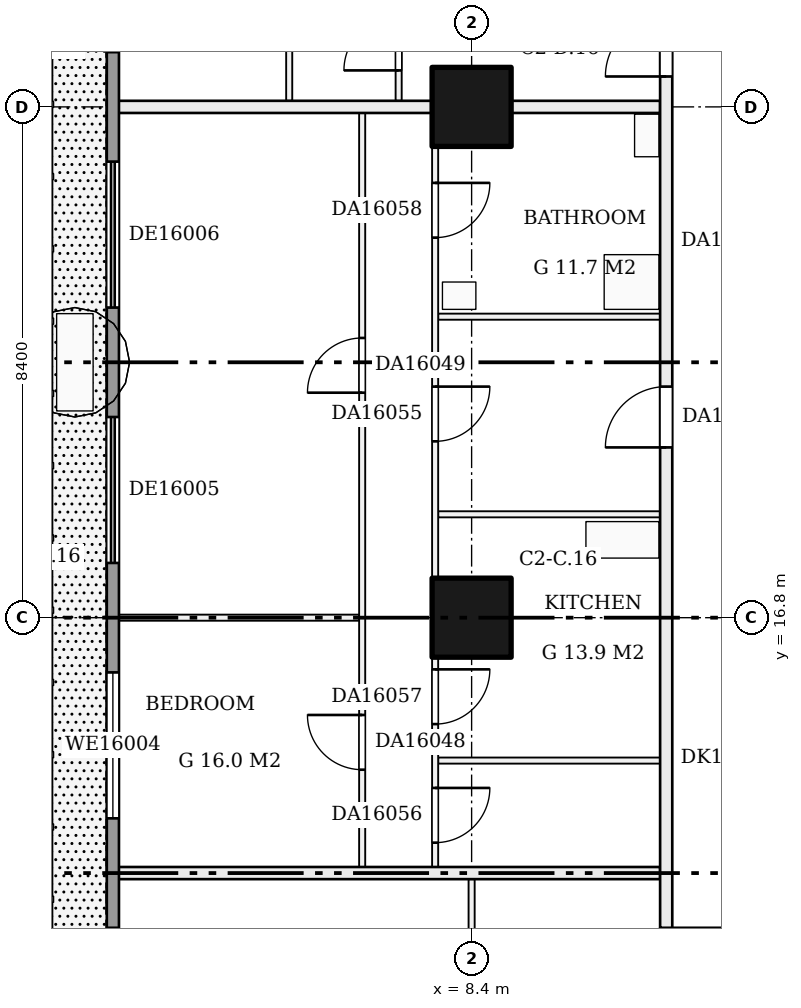
"""IFC4 building model, lengths in metres.
Left out: names, types, materials, properties, quantities, classifications, styles, units other than length and angle.
Written with IfcOpenShell. Run it as: python <this file> out.ifc"""

import sys

from ifc_helpers import new_model, si_unit, direction, frame, frame_2d, origin, origin_2d, place, context, subcontext, project, spatial, rectangle, extrude, element, fill, save


model = new_model("IFC4")
c1 = context("Model", 3, precision=1e-05, world=origin(), true_north=direction((0.0, 1.0)))
c2 = subcontext(c1, "Body", "Model", "MODEL_VIEW")
j1 = project(units=[si_unit("LENGTHUNIT", "METRE"), si_unit("PLANEANGLEUNIT", "RADIAN")], contexts=[c1])
p1 = place(None, origin())
s1 = spatial("IfcSite", under=j1, at=p1, CompositionType="ELEMENT")
p2 = place(p1, origin())
s2 = spatial("IfcBuilding", under=s1, at=p2, CompositionType="ELEMENT")
p3 = place(p2, frame((0.0, 0.0, 67.2)))
s3 = spatial("IfcBuildingStorey", under=s2, at=p3, CompositionType="ELEMENT", Elevation=67.2)
for number, where, z_axis, x_axis in (
    (1, (8.4, 16.8, 0.0), (0.0, 0.0, 1.0), (1.0, 0.0, 0.0)),
    (2, (8.4, 25.2, 0.0), (0.0, 0.0, 1.0), (1.0, 0.0, 0.0)),
):
    element("IfcColumn", number, at=place(p3, frame(where, z_axis=z_axis, x_axis=x_axis)), inside=s3, PredefinedType="COLUMN", context=c2, shape_type="SweptSolid", body=[
        extrude(rectangle(XDim=1.3, YDim=1.3, at=origin_2d()), origin(), (0.0, 0.0, 1.0), 3.22),
    ])
p4 = place(p3, frame((11.5, 11.6, 0.0), z_axis=(0.0, 0.0, 1.0), x_axis=(1.0, 0.0, 0.0)))
e3 = element("IfcWall", 3, at=p4, inside=s3, PredefinedType="PARTITIONING", context=c2, shape_type="SweptSolid", body=[
    extrude(rectangle(XDim=30.5, YDim=0.2, at=frame_2d((15.25, 0.0))), origin(), (0.0, 0.0, 1.0), 3.22),
])
p5 = place(p4, frame((1.6, 0.0, 0.0)))
e4 = element("IfcOpeningElement", 4, at=p5, cuts=e3, PredefinedType="OPENING", context=c2, shape_type="SweptSolid", body=[
    extrude(rectangle(XDim=1.0, YDim=2.1, at=frame_2d((0.5, 1.05))), frame((0.0, 0.11, 0.0), z_axis=(0.0, -1.0, 0.0), x_axis=(1.0, 0.0, 0.0)), (0.0, 0.0, 1.0), 0.22),
])
p6 = place(p4, frame((8.04, 0.0, 0.0)))
e5 = element("IfcOpeningElement", 5, at=p6, cuts=e3, PredefinedType="OPENING", context=c2, shape_type="SweptSolid", body=[
    extrude(rectangle(XDim=1.0, YDim=2.1, at=frame_2d((0.5, 1.05))), frame((0.0, 0.11, 0.0), z_axis=(0.0, -1.0, 0.0), x_axis=(1.0, 0.0, 0.0)), (0.0, 0.0, 1.0), 0.22),
])
p7 = place(p4, frame((10.5, 0.0, 0.0)))
e6 = element("IfcOpeningElement", 6, at=p7, cuts=e3, PredefinedType="OPENING", context=c2, shape_type="SweptSolid", body=[
    extrude(rectangle(XDim=1.0, YDim=2.1, at=frame_2d((0.5, 1.05))), frame((0.0, 0.11, 0.0), z_axis=(0.0, -1.0, 0.0), x_axis=(1.0, 0.0, 0.0)), (0.0, 0.0, 1.0), 0.22),
])
p8 = place(p4, frame((28.733, 0.0, 0.0)))
e7 = element("IfcOpeningElement", 7, at=p8, cuts=e3, PredefinedType="OPENING", context=c2, shape_type="SweptSolid", body=[
    extrude(rectangle(XDim=1.0, YDim=2.1, at=frame_2d((0.5, 1.05))), frame((0.0, 0.11, 0.0), z_axis=(0.0, -1.0, 0.0), x_axis=(1.0, 0.0, 0.0)), (0.0, 0.0, 1.0), 0.22),
])
p9 = place(p3, frame((2.5, 12.6, 0.0), z_axis=(0.0, 0.0, 1.0), x_axis=(1.0, 0.0, 0.0)))
e8 = element("IfcWall", 8, at=p9, inside=s3, PredefinedType="PARTITIONING", context=c2, shape_type="SweptSolid", body=[
    extrude(rectangle(XDim=9.0, YDim=0.2, at=frame_2d((4.5, 0.0))), origin(), (0.0, 0.0, 1.0), 3.22),
])
p10 = place(p3, frame((7.85, 14.45, 0.0), z_axis=(0.0, 0.0, 1.0), x_axis=(1.0, 0.0, 0.0)))
e9 = element("IfcWall", 9, at=p10, inside=s3, PredefinedType="PARTITIONING", context=c2, shape_type="SweptSolid", body=[
    extrude(rectangle(XDim=3.65, YDim=0.1, at=frame_2d((1.825, 0.0))), origin(), (0.0, 0.0, 1.0), 3.22),
])
p11 = place(p3, frame((2.5, 16.8, 0.0), z_axis=(0.0, 0.0, 1.0), x_axis=(1.0, 0.0, 0.0)))
e10 = element("IfcWall", 10, at=p11, inside=s3, PredefinedType="PARTITIONING", context=c2, shape_type="SweptSolid", body=[
    extrude(rectangle(XDim=4.05, YDim=0.1, at=frame_2d((2.025, 0.0))), origin(), (0.0, 0.0, 1.0), 3.22),
])
for number, where, z_axis, x_axis in (
    (11, (7.85, 18.5, 0.0), (0.0, 0.0, 1.0), (1.0, 0.0, 0.0)),
    (12, (7.85, 21.75, 0.0), (0.0, 0.0, 1.0), (1.0, 0.0, 0.0)),
):
    element("IfcWall", number, at=place(p3, frame(where, z_axis=z_axis, x_axis=x_axis)), inside=s3, PredefinedType="PARTITIONING", context=c2, shape_type="SweptSolid", body=[
        extrude(rectangle(XDim=3.65, YDim=0.1, at=frame_2d((1.825, 0.0))), origin(), (0.0, 0.0, 1.0), 3.22),
    ])
p12 = place(p3, frame((2.5, 25.2, 0.0), z_axis=(0.0, 0.0, 1.0), x_axis=(1.0, 0.0, 0.0)))
e13 = element("IfcWall", 13, at=p12, inside=s3, PredefinedType="PARTITIONING", context=c2, shape_type="SweptSolid", body=[
    extrude(rectangle(XDim=9.0, YDim=0.2, at=frame_2d((4.5, 0.0))), origin(), (0.0, 0.0, 1.0), 3.22),
])
p13 = place(p3, frame((5.4, 25.3, 0.0), z_axis=(0.0, 0.0, 1.0), x_axis=(0.0, 1.0, 0.0)))
e14 = element("IfcWall", 14, at=p13, inside=s3, PredefinedType="PARTITIONING", context=c2, shape_type="SweptSolid", body=[
    extrude(rectangle(XDim=4.0, YDim=0.1, at=frame_2d((2.0, 0.0))), origin(), (0.0, 0.0, 1.0), 3.22),
])
p14 = place(p13, frame((1.5, 0.0, 0.0)))
e15 = element("IfcOpeningElement", 15, at=p14, cuts=e14, PredefinedType="OPENING", context=c2, shape_type="SweptSolid", body=[
    extrude(rectangle(XDim=0.9, YDim=2.1, at=frame_2d((0.45, 1.05))), frame((0.0, 0.06, 0.0), z_axis=(0.0, -1.0, 0.0), x_axis=(1.0, 0.0, 0.0)), (0.0, 0.0, 1.0), 0.12),
])
p15 = place(p3, frame((6.6, 12.7, 0.0), z_axis=(0.0, 0.0, 1.0), x_axis=(0.0, 1.0, 0.0)))
e16 = element("IfcWall", 16, at=p15, inside=s3, PredefinedType="PARTITIONING", context=c2, shape_type="SweptSolid", body=[
    extrude(rectangle(XDim=12.4, YDim=0.1, at=frame_2d((6.2, 0.0))), origin(), (0.0, 0.0, 1.0), 3.22),
])
p16 = place(p15, frame((1.6, 0.0, 0.0)))
e17 = element("IfcOpeningElement", 17, at=p16, cuts=e16, PredefinedType="OPENING", context=c2, shape_type="SweptSolid", body=[
    extrude(rectangle(XDim=0.9, YDim=2.1, at=frame_2d((0.45, 1.05))), frame((0.0, 0.06, 0.0), z_axis=(0.0, -1.0, 0.0), x_axis=(1.0, 0.0, 0.0)), (0.0, 0.0, 1.0), 0.12),
])
p17 = place(p15, frame((7.8, 0.0, 0.0)))
e18 = element("IfcOpeningElement", 18, at=p17, cuts=e16, PredefinedType="OPENING", context=c2, shape_type="SweptSolid", body=[
    extrude(rectangle(XDim=0.9, YDim=2.1, at=frame_2d((0.45, 1.05))), frame((0.0, 0.06, 0.0), z_axis=(0.0, -1.0, 0.0), x_axis=(1.0, 0.0, 0.0)), (0.0, 0.0, 1.0), 0.12),
])
p18 = place(p3, frame((7.2, 25.3, 0.0), z_axis=(0.0, 0.0, 1.0), x_axis=(0.0, 1.0, 0.0)))
e19 = element("IfcWall", 19, at=p18, inside=s3, PredefinedType="PARTITIONING", context=c2, shape_type="SweptSolid", body=[
    extrude(rectangle(XDim=4.0, YDim=0.1, at=frame_2d((2.0, 0.0))), origin(), (0.0, 0.0, 1.0), 3.22),
])
p19 = place(p18, frame((0.5, 0.0, 0.0)))
e20 = element("IfcOpeningElement", 20, at=p19, cuts=e19, PredefinedType="OPENING", context=c2, shape_type="SweptSolid", body=[
    extrude(rectangle(XDim=0.9, YDim=2.1, at=frame_2d((0.45, 1.05))), frame((0.0, 0.06, 0.0), z_axis=(0.0, -1.0, 0.0), x_axis=(1.0, 0.0, 0.0)), (0.0, 0.0, 1.0), 0.12),
])
p20 = place(p18, frame((2.56, 0.0, 0.0)))
e21 = element("IfcOpeningElement", 21, at=p20, cuts=e19, PredefinedType="OPENING", context=c2, shape_type="SweptSolid", body=[
    extrude(rectangle(XDim=0.9, YDim=2.1, at=frame_2d((0.45, 1.05))), frame((0.0, 0.06, 0.0), z_axis=(0.0, -1.0, 0.0), x_axis=(1.0, 0.0, 0.0)), (0.0, 0.0, 1.0), 0.12),
])
p21 = place(p3, frame((7.8, 12.7, 0.0), z_axis=(0.0, 0.0, 1.0), x_axis=(0.0, 1.0, 0.0)))
e22 = element("IfcWall", 22, at=p21, inside=s3, PredefinedType="PARTITIONING", context=c2, shape_type="SweptSolid", body=[
    extrude(rectangle(XDim=12.4, YDim=0.1, at=frame_2d((6.2, 0.0))), origin(), (0.0, 0.0, 1.0), 3.22),
])
p22 = place(p21, frame((7.0, 0.0, 0.0)))
e23 = element("IfcOpeningElement", 23, at=p22, cuts=e22, PredefinedType="OPENING", context=c2, shape_type="SweptSolid", body=[
    extrude(rectangle(XDim=0.9, YDim=2.1, at=frame_2d((0.45, 1.05))), frame((0.0, 0.06, 0.0), z_axis=(0.0, -1.0, 0.0), x_axis=(1.0, 0.0, 0.0)), (0.0, 0.0, 1.0), 0.12),
])
p23 = place(p21, frame((0.4, 0.0, 0.0)))
e24 = element("IfcOpeningElement", 24, at=p23, cuts=e22, PredefinedType="OPENING", context=c2, shape_type="SweptSolid", body=[
    extrude(rectangle(XDim=0.9, YDim=2.1, at=frame_2d((0.45, 1.05))), frame((0.0, 0.06, 0.0), z_axis=(0.0, -1.0, 0.0), x_axis=(1.0, 0.0, 0.0)), (0.0, 0.0, 1.0), 0.12),
])
p24 = place(p21, frame((2.35, 0.0, 0.0)))
e25 = element("IfcOpeningElement", 25, at=p24, cuts=e22, PredefinedType="OPENING", context=c2, shape_type="SweptSolid", body=[
    extrude(rectangle(XDim=0.9, YDim=2.1, at=frame_2d((0.45, 1.05))), frame((0.0, 0.06, 0.0), z_axis=(0.0, -1.0, 0.0), x_axis=(1.0, 0.0, 0.0)), (0.0, 0.0, 1.0), 0.12),
])
p25 = place(p21, frame((10.35, 0.0, 0.0)))
e26 = element("IfcOpeningElement", 26, at=p25, cuts=e22, PredefinedType="OPENING", context=c2, shape_type="SweptSolid", body=[
    extrude(rectangle(XDim=0.9, YDim=2.1, at=frame_2d((0.45, 1.05))), frame((0.0, 0.06, 0.0), z_axis=(0.0, -1.0, 0.0), x_axis=(1.0, 0.0, 0.0)), (0.0, 0.0, 1.0), 0.12),
])
p26 = place(p3, frame((8.4, 9.1, 0.0), z_axis=(0.0, 0.0, 1.0), x_axis=(0.0, 1.0, 0.0)))
e27 = element("IfcWall", 27, at=p26, inside=s3, PredefinedType="PARTITIONING", context=c2, shape_type="SweptSolid", body=[
    extrude(rectangle(XDim=3.4, YDim=0.1, at=frame_2d((1.7, 0.0))), origin(), (0.0, 0.0, 1.0), 3.22),
])
p27 = place(p3, frame((11.6, 11.7, 0.0), z_axis=(0.0, 0.0, 1.0), x_axis=(0.0, 1.0, 0.0)))
e28 = element("IfcWall", 28, at=p27, inside=s3, PredefinedType="PARTITIONING", context=c2, shape_type="SweptSolid", body=[
    extrude(rectangle(XDim=30.3, YDim=0.2, at=frame_2d((15.15, 0.0))), origin(), (0.0, 0.0, 1.0), 3.22),
])
p28 = place(p27, frame((7.9, 0.0, 0.0)))
e29 = element("IfcOpeningElement", 29, at=p28, cuts=e28, PredefinedType="OPENING", context=c2, shape_type="SweptSolid", body=[
    extrude(rectangle(XDim=1.0, YDim=2.1, at=frame_2d((0.5, 1.05))), frame((0.0, 0.11, 0.0), z_axis=(0.0, -1.0, 0.0), x_axis=(1.0, 0.0, 0.0)), (0.0, 0.0, 1.0), 0.22),
])
p29 = place(p27, frame((14.0, 0.0, 0.0)))
e30 = element("IfcOpeningElement", 30, at=p29, cuts=e28, PredefinedType="OPENING", context=c2, shape_type="SweptSolid", body=[
    extrude(rectangle(XDim=1.0, YDim=2.1, at=frame_2d((0.5, 1.05))), frame((0.0, 0.11, 0.0), z_axis=(0.0, -1.0, 0.0), x_axis=(1.0, 0.0, 0.0)), (0.0, 0.0, 1.0), 0.22),
])
p30 = place(p27, frame((22.92, 0.0, 0.0)))
e31 = element("IfcOpeningElement", 31, at=p30, cuts=e28, PredefinedType="OPENING", context=c2, shape_type="SweptSolid", body=[
    extrude(rectangle(XDim=1.0, YDim=2.1, at=frame_2d((0.5, 1.05))), frame((0.0, 0.11, 0.0), z_axis=(0.0, -1.0, 0.0), x_axis=(1.0, 0.0, 0.0)), (0.0, 0.0, 1.0), 0.22),
])
p31 = place(p3, frame((2.5, 53.8, 0.0), z_axis=(0.0, 0.0, 1.0), x_axis=(0.0, -1.0, 0.0)))
e32 = element("IfcWall", 32, at=p31, inside=s3, PredefinedType="SOLIDWALL", context=c2, shape_type="SweptSolid", body=[
    extrude(rectangle(XDim=48.8, YDim=0.2, at=frame_2d((24.4, 0.0))), origin(), (0.0, 0.0, 1.0), 3.22),
])
p32 = place(p31, frame((46.1, 0.0, 0.0)))
e33 = element("IfcOpeningElement", 33, at=p32, cuts=e32, PredefinedType="OPENING", context=c2, shape_type="SweptSolid", body=[
    extrude(rectangle(XDim=2.4, YDim=2.2, at=frame_2d((1.2, 1.1))), frame((0.0, 0.11, 0.0), z_axis=(0.0, -1.0, 0.0), x_axis=(1.0, 0.0, 0.0)), (0.0, 0.0, 1.0), 0.22),
])
p33 = place(p31, frame((42.1, 0.0, 0.0)))
e34 = element("IfcOpeningElement", 34, at=p33, cuts=e32, PredefinedType="OPENING", context=c2, shape_type="SweptSolid", body=[
    extrude(rectangle(XDim=2.4, YDim=2.2, at=frame_2d((1.2, 1.1))), frame((0.0, 0.11, 0.0), z_axis=(0.0, -1.0, 0.0), x_axis=(1.0, 0.0, 0.0)), (0.0, 0.0, 1.0), 0.22),
])
p34 = place(p31, frame((37.9, 0.0, 0.9)))
e35 = element("IfcOpeningElement", 35, at=p34, cuts=e32, PredefinedType="OPENING", context=c2, shape_type="SweptSolid", body=[
    extrude(rectangle(XDim=2.4, YDim=1.5, at=frame_2d((1.2, 0.75))), frame((0.0, 0.11, 0.0), z_axis=(0.0, -1.0, 0.0), x_axis=(1.0, 0.0, 0.0)), (0.0, 0.0, 1.0), 0.22),
])
p35 = place(p31, frame((33.7, 0.0, 0.0)))
e36 = element("IfcOpeningElement", 36, at=p35, cuts=e32, PredefinedType="OPENING", context=c2, shape_type="SweptSolid", body=[
    extrude(rectangle(XDim=2.4, YDim=2.2, at=frame_2d((1.2, 1.1))), frame((0.0, 0.11, 0.0), z_axis=(0.0, -1.0, 0.0), x_axis=(1.0, 0.0, 0.0)), (0.0, 0.0, 1.0), 0.22),
])
p36 = place(p31, frame((29.5, 0.0, 0.0)))
e37 = element("IfcOpeningElement", 37, at=p36, cuts=e32, PredefinedType="OPENING", context=c2, shape_type="SweptSolid", body=[
    extrude(rectangle(XDim=2.4, YDim=2.2, at=frame_2d((1.2, 1.1))), frame((0.0, 0.11, 0.0), z_axis=(0.0, -1.0, 0.0), x_axis=(1.0, 0.0, 0.0)), (0.0, 0.0, 1.0), 0.22),
])
p37 = place(p31, frame((25.3, 0.0, 0.0)))
e38 = element("IfcOpeningElement", 38, at=p37, cuts=e32, PredefinedType="OPENING", context=c2, shape_type="SweptSolid", body=[
    extrude(rectangle(XDim=2.4, YDim=2.2, at=frame_2d((1.2, 1.1))), frame((0.0, 0.11, 0.0), z_axis=(0.0, -1.0, 0.0), x_axis=(1.0, 0.0, 0.0)), (0.0, 0.0, 1.0), 0.22),
])
p38 = place(p31, frame((21.1, 0.0, 0.9)))
e39 = element("IfcOpeningElement", 39, at=p38, cuts=e32, PredefinedType="OPENING", context=c2, shape_type="SweptSolid", body=[
    extrude(rectangle(XDim=2.4, YDim=1.5, at=frame_2d((1.2, 0.75))), frame((0.0, 0.11, 0.0), z_axis=(0.0, -1.0, 0.0), x_axis=(1.0, 0.0, 0.0)), (0.0, 0.0, 1.0), 0.22),
])
p39 = place(p31, frame((16.9, 0.0, 0.0)))
e40 = element("IfcOpeningElement", 40, at=p39, cuts=e32, PredefinedType="OPENING", context=c2, shape_type="SweptSolid", body=[
    extrude(rectangle(XDim=2.4, YDim=2.2, at=frame_2d((1.2, 1.1))), frame((0.0, 0.11, 0.0), z_axis=(0.0, -1.0, 0.0), x_axis=(1.0, 0.0, 0.0)), (0.0, 0.0, 1.0), 0.22),
])
p40 = place(p31, frame((12.7, 0.0, 0.9)))
e41 = element("IfcOpeningElement", 41, at=p40, cuts=e32, PredefinedType="OPENING", context=c2, shape_type="SweptSolid", body=[
    extrude(rectangle(XDim=2.4, YDim=1.5, at=frame_2d((1.2, 0.75))), frame((0.0, 0.11, 0.0), z_axis=(0.0, -1.0, 0.0), x_axis=(1.0, 0.0, 0.0)), (0.0, 0.0, 1.0), 0.22),
])
p41 = place(p31, frame((8.5, 0.0, 0.9)))
e42 = element("IfcOpeningElement", 42, at=p41, cuts=e32, PredefinedType="OPENING", context=c2, shape_type="SweptSolid", body=[
    extrude(rectangle(XDim=2.4, YDim=1.5, at=frame_2d((1.2, 0.75))), frame((0.0, 0.11, 0.0), z_axis=(0.0, -1.0, 0.0), x_axis=(1.0, 0.0, 0.0)), (0.0, 0.0, 1.0), 0.22),
])
p42 = place(p31, frame((4.3, 0.0, 0.0)))
e43 = element("IfcOpeningElement", 43, at=p42, cuts=e32, PredefinedType="OPENING", context=c2, shape_type="SweptSolid", body=[
    extrude(rectangle(XDim=2.4, YDim=2.2, at=frame_2d((1.2, 1.1))), frame((0.0, 0.11, 0.0), z_axis=(0.0, -1.0, 0.0), x_axis=(1.0, 0.0, 0.0)), (0.0, 0.0, 1.0), 0.22),
])
p43 = place(p31, frame((0.3, 0.0, 0.9)))
e44 = element("IfcOpeningElement", 44, at=p43, cuts=e32, PredefinedType="OPENING", context=c2, shape_type="SweptSolid", body=[
    extrude(rectangle(XDim=2.4, YDim=1.5, at=frame_2d((1.2, 0.75))), frame((0.0, 0.11, 0.0), z_axis=(0.0, -1.0, 0.0), x_axis=(1.0, 0.0, 0.0)), (0.0, 0.0, 1.0), 0.22),
])
p44 = place(p16, origin())
e45 = element("IfcDoor", 45, at=p44, inside=s3, OperationType="SINGLE_SWING_RIGHT", PredefinedType="DOOR", context=c2, shape_type="SweptSolid", body=[
    extrude(rectangle(XDim=0.9, YDim=2.1, at=frame_2d((0.45, 1.05))), frame((0.0, 0.025, 0.0), z_axis=(0.0, -1.0, 0.0), x_axis=(1.0, 0.0, 0.0)), (0.0, 0.0, 1.0), 0.05),
])
fill(e17, e45)
p45 = place(p17, origin())
e46 = element("IfcDoor", 46, at=p45, inside=s3, OperationType="SINGLE_SWING_LEFT", PredefinedType="DOOR", context=c2, shape_type="SweptSolid", body=[
    extrude(rectangle(XDim=0.9, YDim=2.1, at=frame_2d((0.45, 1.05))), frame((0.0, 0.025, 0.0), z_axis=(0.0, -1.0, 0.0), x_axis=(1.0, 0.0, 0.0)), (0.0, 0.0, 1.0), 0.05),
])
fill(e18, e46)
p46 = place(p19, origin())
e47 = element("IfcDoor", 47, at=p46, inside=s3, OperationType="SINGLE_SWING_LEFT", PredefinedType="DOOR", context=c2, shape_type="SweptSolid", body=[
    extrude(rectangle(XDim=0.9, YDim=2.1, at=frame_2d((0.45, 1.05))), frame((0.0, 0.025, 0.0), z_axis=(0.0, -1.0, 0.0), x_axis=(1.0, 0.0, 0.0)), (0.0, 0.0, 1.0), 0.05),
])
fill(e20, e47)
p47 = place(p22, frame((0.9, 0.0, 0.0), z_axis=(0.0, 0.0, 1.0), x_axis=(-1.0, 0.0, 0.0)))
e48 = element("IfcDoor", 48, at=p47, inside=s3, OperationType="SINGLE_SWING_LEFT", PredefinedType="DOOR", context=c2, shape_type="SweptSolid", body=[
    extrude(rectangle(XDim=0.9, YDim=2.1, at=frame_2d((0.45, 1.05))), frame((0.0, 0.025, 0.0), z_axis=(0.0, -1.0, 0.0), x_axis=(1.0, 0.0, 0.0)), (0.0, 0.0, 1.0), 0.05),
])
fill(e23, e48)
p48 = place(p23, frame((0.9, 0.0, 0.0), z_axis=(0.0, 0.0, 1.0), x_axis=(-1.0, 0.0, 0.0)))
e49 = element("IfcDoor", 49, at=p48, inside=s3, OperationType="SINGLE_SWING_LEFT", PredefinedType="DOOR", context=c2, shape_type="SweptSolid", body=[
    extrude(rectangle(XDim=0.9, YDim=2.1, at=frame_2d((0.45, 1.05))), frame((0.0, 0.025, 0.0), z_axis=(0.0, -1.0, 0.0), x_axis=(1.0, 0.0, 0.0)), (0.0, 0.0, 1.0), 0.05),
])
fill(e24, e49)
p49 = place(p24, frame((0.9, 0.0, 0.0), z_axis=(0.0, 0.0, 1.0), x_axis=(-1.0, 0.0, 0.0)))
e50 = element("IfcDoor", 50, at=p49, inside=s3, OperationType="SINGLE_SWING_LEFT", PredefinedType="DOOR", context=c2, shape_type="SweptSolid", body=[
    extrude(rectangle(XDim=0.9, YDim=2.1, at=frame_2d((0.45, 1.05))), frame((0.0, 0.025, 0.0), z_axis=(0.0, -1.0, 0.0), x_axis=(1.0, 0.0, 0.0)), (0.0, 0.0, 1.0), 0.05),
])
fill(e25, e50)
p50 = place(p25, frame((0.9, 0.0, 0.0), z_axis=(0.0, 0.0, 1.0), x_axis=(-1.0, 0.0, 0.0)))
e51 = element("IfcDoor", 51, at=p50, inside=s3, OperationType="SINGLE_SWING_LEFT", PredefinedType="DOOR", context=c2, shape_type="SweptSolid", body=[
    extrude(rectangle(XDim=0.9, YDim=2.1, at=frame_2d((0.45, 1.05))), frame((0.0, 0.025, 0.0), z_axis=(0.0, -1.0, 0.0), x_axis=(1.0, 0.0, 0.0)), (0.0, 0.0, 1.0), 0.05),
])
fill(e26, e51)
p51 = place(p28, origin())
e52 = element("IfcDoor", 52, at=p51, inside=s3, OperationType="SINGLE_SWING_LEFT", PredefinedType="DOOR", context=c2, shape_type="SweptSolid", body=[
    extrude(rectangle(XDim=1.0, YDim=2.1, at=frame_2d((0.5, 1.05))), frame((0.0, 0.025, 0.0), z_axis=(0.0, -1.0, 0.0), x_axis=(1.0, 0.0, 0.0)), (0.0, 0.0, 1.0), 0.05),
])
fill(e29, e52)
p52 = place(p29, origin())
e53 = element("IfcDoor", 53, at=p52, inside=s3, OperationType="SINGLE_SWING_LEFT", PredefinedType="DOOR", context=c2, shape_type="SweptSolid", body=[
    extrude(rectangle(XDim=1.0, YDim=2.1, at=frame_2d((0.5, 1.05))), frame((0.0, 0.025, 0.0), z_axis=(0.0, -1.0, 0.0), x_axis=(1.0, 0.0, 0.0)), (0.0, 0.0, 1.0), 0.05),
])
fill(e30, e53)
p53 = place(p34, origin())
e54 = element("IfcWindow", 54, at=p53, inside=s3, PartitioningType="SINGLE_PANEL", PredefinedType="WINDOW", context=c2, shape_type="SweptSolid", body=[
    extrude(rectangle(XDim=2.4, YDim=1.5, at=frame_2d((1.2, 0.75))), frame((0.0, 0.03, 0.0), z_axis=(0.0, -1.0, 0.0), x_axis=(1.0, 0.0, 0.0)), (0.0, 0.0, 1.0), 0.06),
])
fill(e35, e54)
p54 = place(p35, origin())
e55 = element("IfcDoor", 55, at=p54, inside=s3, OperationType="DOUBLE_DOOR_SLIDING", PredefinedType="DOOR", context=c2, shape_type="SweptSolid", body=[
    extrude(rectangle(XDim=2.4, YDim=2.2, at=frame_2d((1.2, 1.1))), frame((0.0, 0.025, 0.0), z_axis=(0.0, -1.0, 0.0), x_axis=(1.0, 0.0, 0.0)), (0.0, 0.0, 1.0), 0.05),
])
fill(e36, e55)
p55 = place(p36, origin())
e56 = element("IfcDoor", 56, at=p55, inside=s3, OperationType="DOUBLE_DOOR_SLIDING", PredefinedType="DOOR", context=c2, shape_type="SweptSolid", body=[
    extrude(rectangle(XDim=2.4, YDim=2.2, at=frame_2d((1.2, 1.1))), frame((0.0, 0.025, 0.0), z_axis=(0.0, -1.0, 0.0), x_axis=(1.0, 0.0, 0.0)), (0.0, 0.0, 1.0), 0.05),
])
fill(e37, e56)
save(model, sys.argv[1])
